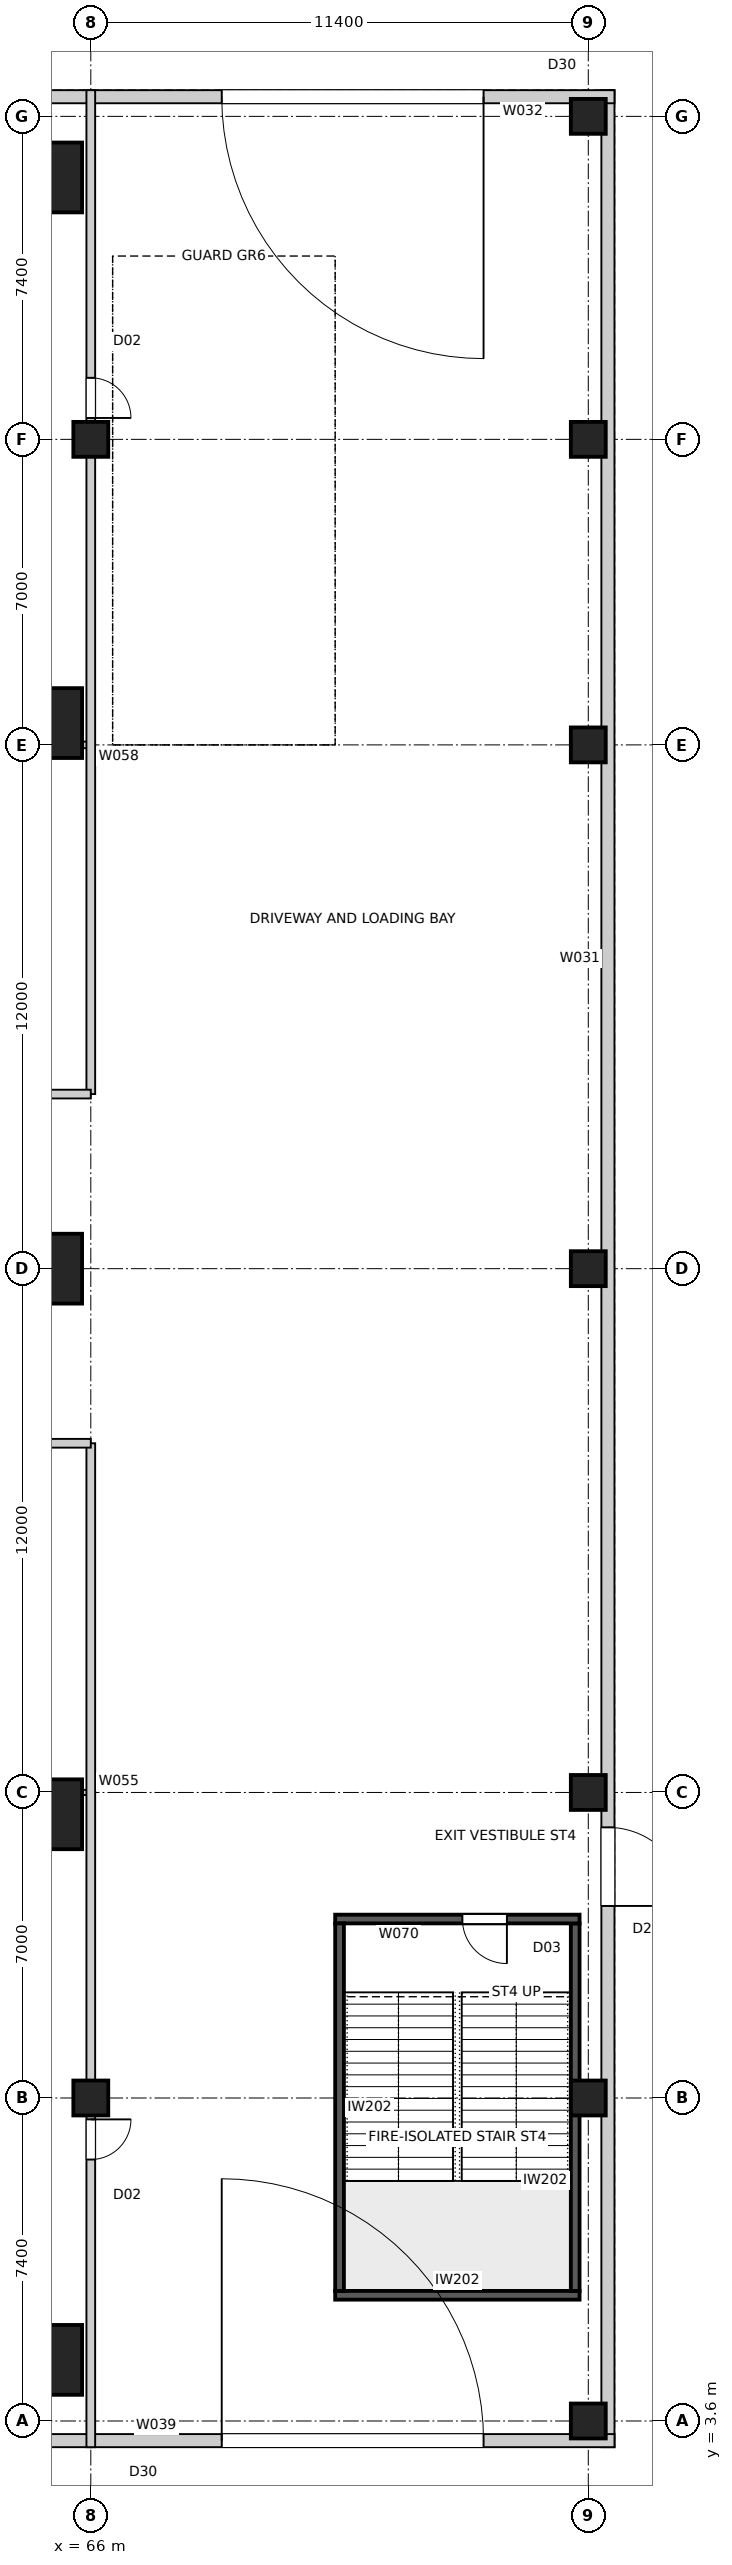
"""IFC4 building model, lengths in metres.
Left out: names, types, materials, properties, quantities, classifications, styles, units other than length and angle.
Written with IfcOpenShell. Run it as: python <this file> out.ifc"""

import sys

from ifc_helpers import new_model, si_unit, direction, frame, frame_2d, origin, origin_2d, place, context, subcontext, project, spatial, rectangle, extrude, element, fill, save


model = new_model("IFC4")
c1 = context("Model", 3, precision=1e-05, world=origin(), true_north=direction((0.0, 1.0)))
c2 = subcontext(c1, "Body", "Model", "MODEL_VIEW")
j1 = project(units=[si_unit("LENGTHUNIT", "METRE"), si_unit("PLANEANGLEUNIT", "RADIAN")], contexts=[c1])
p1 = place(None, origin())
s1 = spatial("IfcSite", under=j1, at=p1, CompositionType="ELEMENT")
p2 = place(p1, origin())
s2 = spatial("IfcBuilding", under=s1, at=p2, CompositionType="ELEMENT")
p3 = place(p2, origin())
s3 = spatial("IfcBuildingStorey", under=s2, at=p3, CompositionType="ELEMENT", Elevation=0.0)
for number, where, z_axis, x_axis in (
    (1, (65.0, 5.0, 0.0), (0.0, 0.0, 1.0), (1.0, 0.0, 0.0)),
    (2, (65.0, 17.5, 0.0), (0.0, 0.0, 1.0), (1.0, 0.0, 0.0)),
    (3, (65.0, 30.0, 0.0), (0.0, 0.0, 1.0), (1.0, 0.0, 0.0)),
    (4, (65.0, 42.5, 0.0), (0.0, 0.0, 1.0), (1.0, 0.0, 0.0)),
    (5, (65.0, 55.0, 0.0), (0.0, 0.0, 1.0), (1.0, 0.0, 0.0)),
):
    element("IfcColumn", number, at=place(p3, frame(where, z_axis=z_axis, x_axis=x_axis)), inside=s3, PredefinedType="COLUMN", context=c2, shape_type="SweptSolid", body=[
        extrude(rectangle(XDim=1.6, YDim=1.6, at=origin_2d()), origin(), (0.0, 0.0, 1.0), 6.0),
    ])
for number, where, z_axis, x_axis in (
    (6, (66.0, 11.0, 0.0), (0.0, 0.0, 1.0), (1.0, 0.0, 0.0)),
    (7, (66.0, 49.0, 0.0), (0.0, 0.0, 1.0), (1.0, 0.0, 0.0)),
    (8, (77.4, 3.6, 0.0), (0.0, 0.0, 1.0), (1.0, 0.0, 0.0)),
    (9, (77.4, 11.0, 0.0), (0.0, 0.0, 1.0), (1.0, 0.0, 0.0)),
    (10, (77.4, 18.0, 0.0), (0.0, 0.0, 1.0), (1.0, 0.0, 0.0)),
    (11, (77.4, 30.0, 0.0), (0.0, 0.0, 1.0), (1.0, 0.0, 0.0)),
    (12, (77.4, 42.0, 0.0), (0.0, 0.0, 1.0), (1.0, 0.0, 0.0)),
    (13, (77.4, 49.0, 0.0), (0.0, 0.0, 1.0), (1.0, 0.0, 0.0)),
    (14, (77.4, 56.4, 0.0), (0.0, 0.0, 1.0), (1.0, 0.0, 0.0)),
):
    element("IfcColumn", number, at=place(p3, frame(where, z_axis=z_axis, x_axis=x_axis)), inside=s3, PredefinedType="COLUMN", context=c2, shape_type="SweptSolid", body=[
        extrude(rectangle(XDim=0.8, YDim=0.8, at=origin_2d()), origin(), (0.0, 0.0, 1.0), 6.0),
    ])
p4 = place(p3, frame((40.0, 3.15, 0.0), z_axis=(0.0, 0.0, 1.0), x_axis=(1.0, 0.0, 0.0)))
e15 = element("IfcWall", 15, at=p4, inside=s3, PredefinedType="SOLIDWALL", context=c2, shape_type="SweptSolid", body=[
    extrude(rectangle(XDim=26.0, YDim=0.3, at=frame_2d((13.0, 0.0))), origin(), (0.0, 0.0, 1.0), 5.65),
])
p5 = place(p4, frame((2.8, 0.0, 0.6)))
e16 = element("IfcOpeningElement", 16, at=p5, cuts=e15, PredefinedType="OPENING", context=c2, shape_type="SweptSolid", body=[
    extrude(rectangle(XDim=2.4, YDim=3.6, at=frame_2d((1.2, 1.8))), frame((0.0, 0.16, 0.0), z_axis=(0.0, -1.0, 0.0), x_axis=(1.0, 0.0, 0.0)), (0.0, 0.0, 1.0), 0.32),
])
p6 = place(p4, frame((8.8, 0.0, 0.6)))
e17 = element("IfcOpeningElement", 17, at=p6, cuts=e15, PredefinedType="OPENING", context=c2, shape_type="SweptSolid", body=[
    extrude(rectangle(XDim=2.4, YDim=3.6, at=frame_2d((1.2, 1.8))), frame((0.0, 0.16, 0.0), z_axis=(0.0, -1.0, 0.0), x_axis=(1.0, 0.0, 0.0)), (0.0, 0.0, 1.0), 0.32),
])
p7 = place(p4, frame((15.1, 0.0, 0.0)))
e18 = element("IfcOpeningElement", 18, at=p7, cuts=e15, PredefinedType="OPENING", context=c2, shape_type="SweptSolid", body=[
    extrude(rectangle(XDim=1.8, YDim=2.7, at=frame_2d((0.9, 1.35))), frame((0.0, 0.16, 0.0), z_axis=(0.0, -1.0, 0.0), x_axis=(1.0, 0.0, 0.0)), (0.0, 0.0, 1.0), 0.32),
])
p8 = place(p4, frame((20.8, 0.0, 0.6)))
e19 = element("IfcOpeningElement", 19, at=p8, cuts=e15, PredefinedType="OPENING", context=c2, shape_type="SweptSolid", body=[
    extrude(rectangle(XDim=2.4, YDim=3.6, at=frame_2d((1.2, 1.8))), frame((0.0, 0.16, 0.0), z_axis=(0.0, -1.0, 0.0), x_axis=(1.0, 0.0, 0.0)), (0.0, 0.0, 1.0), 0.32),
])
p9 = place(p3, frame((66.0, 3.15, 0.0), z_axis=(0.0, 0.0, 1.0), x_axis=(1.0, 0.0, 0.0)))
e20 = element("IfcWall", 20, at=p9, inside=s3, PredefinedType="SOLIDWALL", context=c2, shape_type="SweptSolid", body=[
    extrude(rectangle(XDim=12.0, YDim=0.3, at=frame_2d((6.0, 0.0))), origin(), (0.0, 0.0, 1.0), 5.65),
])
p10 = place(p9, frame((3.0, 0.0, 0.0)))
e21 = element("IfcOpeningElement", 21, at=p10, cuts=e20, PredefinedType="OPENING", context=c2, shape_type="SweptSolid", body=[
    extrude(rectangle(XDim=6.0, YDim=4.5, at=frame_2d((3.0, 2.25))), frame((0.0, 0.16, 0.0), z_axis=(0.0, -1.0, 0.0), x_axis=(1.0, 0.0, 0.0)), (0.0, 0.0, 1.0), 0.32),
])
p11 = place(p3, frame((78.0, 56.85, 0.0), z_axis=(0.0, 0.0, 1.0), x_axis=(-1.0, 0.0, 0.0)))
e22 = element("IfcWall", 22, at=p11, inside=s3, PredefinedType="SOLIDWALL", context=c2, shape_type="SweptSolid", body=[
    extrude(rectangle(XDim=12.0, YDim=0.3, at=frame_2d((6.0, 0.0))), origin(), (0.0, 0.0, 1.0), 5.65),
])
p12 = place(p11, frame((3.0, 0.0, 0.0)))
e23 = element("IfcOpeningElement", 23, at=p12, cuts=e22, PredefinedType="OPENING", context=c2, shape_type="SweptSolid", body=[
    extrude(rectangle(XDim=6.0, YDim=4.5, at=frame_2d((3.0, 2.25))), frame((0.0, 0.16, 0.0), z_axis=(0.0, -1.0, 0.0), x_axis=(1.0, 0.0, 0.0)), (0.0, 0.0, 1.0), 0.32),
])
p13 = place(p3, frame((66.0, 56.85, 0.0), z_axis=(0.0, 0.0, 1.0), x_axis=(-1.0, 0.0, 0.0)))
e24 = element("IfcWall", 24, at=p13, inside=s3, PredefinedType="SOLIDWALL", context=c2, shape_type="SweptSolid", body=[
    extrude(rectangle(XDim=26.0, YDim=0.3, at=frame_2d((13.0, 0.0))), origin(), (0.0, 0.0, 1.0), 5.65),
])
p14 = place(p13, frame((2.8, 0.0, 0.6)))
e25 = element("IfcOpeningElement", 25, at=p14, cuts=e24, PredefinedType="OPENING", context=c2, shape_type="SweptSolid", body=[
    extrude(rectangle(XDim=2.4, YDim=3.6, at=frame_2d((1.2, 1.8))), frame((0.0, 0.16, 0.0), z_axis=(0.0, -1.0, 0.0), x_axis=(1.0, 0.0, 0.0)), (0.0, 0.0, 1.0), 0.32),
])
p15 = place(p13, frame((8.8, 0.0, 0.6)))
e26 = element("IfcOpeningElement", 26, at=p15, cuts=e24, PredefinedType="OPENING", context=c2, shape_type="SweptSolid", body=[
    extrude(rectangle(XDim=2.4, YDim=3.6, at=frame_2d((1.2, 1.8))), frame((0.0, 0.16, 0.0), z_axis=(0.0, -1.0, 0.0), x_axis=(1.0, 0.0, 0.0)), (0.0, 0.0, 1.0), 0.32),
])
p16 = place(p13, frame((15.1, 0.0, 0.0)))
e27 = element("IfcOpeningElement", 27, at=p16, cuts=e24, PredefinedType="OPENING", context=c2, shape_type="SweptSolid", body=[
    extrude(rectangle(XDim=1.8, YDim=2.7, at=frame_2d((0.9, 1.35))), frame((0.0, 0.16, 0.0), z_axis=(0.0, -1.0, 0.0), x_axis=(1.0, 0.0, 0.0)), (0.0, 0.0, 1.0), 0.32),
])
p17 = place(p13, frame((20.8, 0.0, 0.6)))
e28 = element("IfcOpeningElement", 28, at=p17, cuts=e24, PredefinedType="OPENING", context=c2, shape_type="SweptSolid", body=[
    extrude(rectangle(XDim=2.4, YDim=3.6, at=frame_2d((1.2, 1.8))), frame((0.0, 0.16, 0.0), z_axis=(0.0, -1.0, 0.0), x_axis=(1.0, 0.0, 0.0)), (0.0, 0.0, 1.0), 0.32),
])
p18 = place(p3, frame((77.85, 3.0, 0.0), z_axis=(0.0, 0.0, 1.0), x_axis=(0.0, 1.0, 0.0)))
e29 = element("IfcWall", 29, at=p18, inside=s3, PredefinedType="SOLIDWALL", context=c2, shape_type="SweptSolid", body=[
    extrude(rectangle(XDim=54.0, YDim=0.3, at=frame_2d((27.0, 0.0))), origin(), (0.0, 0.0, 1.0), 5.65),
])
p19 = place(p18, frame((12.4, 0.0, 0.0)))
e30 = element("IfcOpeningElement", 30, at=p19, cuts=e29, PredefinedType="OPENING", context=c2, shape_type="SweptSolid", body=[
    extrude(rectangle(XDim=1.8, YDim=2.7, at=frame_2d((0.9, 1.35))), frame((0.0, 0.16, 0.0), z_axis=(0.0, -1.0, 0.0), x_axis=(1.0, 0.0, 0.0)), (0.0, 0.0, 1.0), 0.32),
])
p20 = place(p3, frame((71.6, 6.48, 0.0), z_axis=(0.0, 0.0, 1.0), x_axis=(1.0, 0.0, 0.0)))
e31 = element("IfcWall", 31, at=p20, inside=s3, PredefinedType="SOLIDWALL", context=c2, shape_type="SweptSolid", body=[
    extrude(rectangle(XDim=5.6, YDim=0.2, at=frame_2d((2.8, 0.0))), origin(), (0.0, 0.0, 1.0), 5.65),
])
p21 = place(p3, frame((77.1, 6.58, 0.0), z_axis=(0.0, 0.0, 1.0), x_axis=(0.0, 1.0, 0.0)))
e32 = element("IfcWall", 32, at=p21, inside=s3, PredefinedType="SOLIDWALL", context=c2, shape_type="SweptSolid", body=[
    extrude(rectangle(XDim=8.42, YDim=0.2, at=frame_2d((4.21, 0.0))), origin(), (0.0, 0.0, 1.0), 5.65),
])
p22 = place(p3, frame((77.2, 15.1, 0.0), z_axis=(0.0, 0.0, 1.0), x_axis=(-1.0, 0.0, 0.0)))
e33 = element("IfcWall", 33, at=p22, inside=s3, PredefinedType="SOLIDWALL", context=c2, shape_type="SweptSolid", body=[
    extrude(rectangle(XDim=5.6, YDim=0.2, at=frame_2d((2.8, 0.0))), origin(), (0.0, 0.0, 1.0), 5.65),
])
p23 = place(p22, frame((1.665, 0.0, 0.0)))
e34 = element("IfcOpeningElement", 34, at=p23, cuts=e33, PredefinedType="OPENING", context=c2, shape_type="SweptSolid", body=[
    extrude(rectangle(XDim=1.02, YDim=2.1, at=frame_2d((0.51, 1.05))), frame((0.0, 0.11, 0.0), z_axis=(0.0, -1.0, 0.0), x_axis=(1.0, 0.0, 0.0)), (0.0, 0.0, 1.0), 0.22),
])
p24 = place(p3, frame((71.7, 15.0, 0.0), z_axis=(0.0, 0.0, 1.0), x_axis=(0.0, -1.0, 0.0)))
e35 = element("IfcWall", 35, at=p24, inside=s3, PredefinedType="SOLIDWALL", context=c2, shape_type="SweptSolid", body=[
    extrude(rectangle(XDim=8.42, YDim=0.2, at=frame_2d((4.21, 0.0))), origin(), (0.0, 0.0, 1.0), 5.65),
])
p25 = place(p3, frame((52.1, 18.0, 0.0), z_axis=(0.0, 0.0, 1.0), x_axis=(1.0, 0.0, 0.0)))
e36 = element("IfcWall", 36, at=p25, inside=s3, PredefinedType="PARTITIONING", context=c2, shape_type="SweptSolid", body=[
    extrude(rectangle(XDim=13.9, YDim=0.12, at=frame_2d((6.95, 0.0))), origin(), (0.0, 0.0, 1.0), 5.65),
])
p26 = place(p3, frame((66.0, 26.0, 0.0), z_axis=(0.0, 0.0, 1.0), x_axis=(0.0, -1.0, 0.0)))
e37 = element("IfcWall", 37, at=p26, inside=s3, PredefinedType="PARTITIONING", context=c2, shape_type="SweptSolid", body=[
    extrude(rectangle(XDim=23.0, YDim=0.2, at=frame_2d((11.5, 0.0))), origin(), (0.0, 0.0, 1.0), 5.65),
])
p27 = place(p26, frame((15.49, 0.0, 0.0)))
e38 = element("IfcOpeningElement", 38, at=p27, cuts=e37, PredefinedType="OPENING", context=c2, shape_type="SweptSolid", body=[
    extrude(rectangle(XDim=0.92, YDim=2.34, at=frame_2d((0.46, 1.17))), frame((0.0, 0.11, 0.0), z_axis=(0.0, -1.0, 0.0), x_axis=(1.0, 0.0, 0.0)), (0.0, 0.0, 1.0), 0.22),
])
p28 = place(p3, frame((66.0, 42.0, 0.0), z_axis=(0.0, 0.0, 1.0), x_axis=(-1.0, 0.0, 0.0)))
e39 = element("IfcWall", 39, at=p28, inside=s3, PredefinedType="SOLIDWALL", context=c2, shape_type="SweptSolid", body=[
    extrude(rectangle(XDim=13.9, YDim=0.15, at=frame_2d((6.95, 0.0))), origin(), (0.0, 0.0, 1.0), 5.65),
])
p29 = place(p3, frame((66.0, 57.0, 0.0), z_axis=(0.0, 0.0, 1.0), x_axis=(0.0, -1.0, 0.0)))
e40 = element("IfcWall", 40, at=p29, inside=s3, PredefinedType="PARTITIONING", context=c2, shape_type="SweptSolid", body=[
    extrude(rectangle(XDim=23.0, YDim=0.2, at=frame_2d((11.5, 0.0))), origin(), (0.0, 0.0, 1.0), 5.65),
])
p30 = place(p29, frame((6.59, 0.0, 0.0)))
e41 = element("IfcOpeningElement", 41, at=p30, cuts=e40, PredefinedType="OPENING", context=c2, shape_type="SweptSolid", body=[
    extrude(rectangle(XDim=0.92, YDim=2.34, at=frame_2d((0.46, 1.17))), frame((0.0, 0.11, 0.0), z_axis=(0.0, -1.0, 0.0), x_axis=(1.0, 0.0, 0.0)), (0.0, 0.0, 1.0), 0.22),
])
p31 = place(p3, frame((66.0, 26.0, 0.0), z_axis=(0.0, 0.0, 1.0), x_axis=(-1.0, 0.0, 0.0)))
e42 = element("IfcWall", 42, at=p31, inside=s3, PredefinedType="PARTITIONING", context=c2, shape_type="SweptSolid", body=[
    extrude(rectangle(XDim=13.9, YDim=0.2, at=frame_2d((6.95, 0.0))), origin(), (0.0, 0.0, 1.0), 5.65),
])
p32 = place(p31, frame((6.59, 0.0, 0.0)))
e43 = element("IfcOpeningElement", 43, at=p32, cuts=e42, PredefinedType="OPENING", context=c2, shape_type="SweptSolid", body=[
    extrude(rectangle(XDim=0.92, YDim=2.34, at=frame_2d((0.46, 1.17))), frame((0.0, 0.11, 0.0), z_axis=(0.0, -1.0, 0.0), x_axis=(1.0, 0.0, 0.0)), (0.0, 0.0, 1.0), 0.22),
])
p33 = place(p31, frame((2.065, 0.0, 0.0)))
e44 = element("IfcOpeningElement", 44, at=p33, cuts=e42, PredefinedType="OPENING", context=c2, shape_type="SweptSolid", body=[
    extrude(rectangle(XDim=0.92, YDim=2.34, at=frame_2d((0.46, 1.17))), frame((0.0, 0.11, 0.0), z_axis=(0.0, -1.0, 0.0), x_axis=(1.0, 0.0, 0.0)), (0.0, 0.0, 1.0), 0.22),
])
p34 = place(p31, frame((11.465, 0.0, 0.0)))
e45 = element("IfcOpeningElement", 45, at=p34, cuts=e42, PredefinedType="OPENING", context=c2, shape_type="SweptSolid", body=[
    extrude(rectangle(XDim=0.92, YDim=2.34, at=frame_2d((0.46, 1.17))), frame((0.0, 0.11, 0.0), z_axis=(0.0, -1.0, 0.0), x_axis=(1.0, 0.0, 0.0)), (0.0, 0.0, 1.0), 0.22),
])
p35 = place(p3, frame((52.1, 34.0, 0.0), z_axis=(0.0, 0.0, 1.0), x_axis=(1.0, 0.0, 0.0)))
e46 = element("IfcWall", 46, at=p35, inside=s3, PredefinedType="PARTITIONING", context=c2, shape_type="SweptSolid", body=[
    extrude(rectangle(XDim=13.9, YDim=0.2, at=frame_2d((6.95, 0.0))), origin(), (0.0, 0.0, 1.0), 5.65),
])
p36 = place(p35, frame((9.865, 0.0, 0.0)))
e47 = element("IfcOpeningElement", 47, at=p36, cuts=e46, PredefinedType="OPENING", context=c2, shape_type="SweptSolid", body=[
    extrude(rectangle(XDim=1.02, YDim=2.1, at=frame_2d((0.51, 1.05))), frame((0.0, 0.11, 0.0), z_axis=(0.0, -1.0, 0.0), x_axis=(1.0, 0.0, 0.0)), (0.0, 0.0, 1.0), 0.22),
])
p37 = place(p35, frame((2.965, 0.0, 0.0)))
e48 = element("IfcOpeningElement", 48, at=p37, cuts=e46, PredefinedType="OPENING", context=c2, shape_type="SweptSolid", body=[
    extrude(rectangle(XDim=1.02, YDim=2.1, at=frame_2d((0.51, 1.05))), frame((0.0, 0.11, 0.0), z_axis=(0.0, -1.0, 0.0), x_axis=(1.0, 0.0, 0.0)), (0.0, 0.0, 1.0), 0.22),
])
p38 = place(p10, origin())
e49 = element("IfcDoor", 49, at=p38, inside=s3, OperationType="ROLLINGUP", PredefinedType="DOOR", context=c2, shape_type="SweptSolid", body=[
    extrude(rectangle(XDim=6.0, YDim=4.5, at=frame_2d((3.0, 2.25))), frame((0.0, 0.025, 0.0), z_axis=(0.0, -1.0, 0.0), x_axis=(1.0, 0.0, 0.0)), (0.0, 0.0, 1.0), 0.05),
])
fill(e21, e49)
p39 = place(p12, origin())
e50 = element("IfcDoor", 50, at=p39, inside=s3, OperationType="ROLLINGUP", PredefinedType="DOOR", context=c2, shape_type="SweptSolid", body=[
    extrude(rectangle(XDim=6.0, YDim=4.5, at=frame_2d((3.0, 2.25))), frame((0.0, 0.025, 0.0), z_axis=(0.0, -1.0, 0.0), x_axis=(1.0, 0.0, 0.0)), (0.0, 0.0, 1.0), 0.05),
])
fill(e23, e50)
p40 = place(p19, frame((1.8, 0.0, 0.0), z_axis=(0.0, 0.0, 1.0), x_axis=(-1.0, 0.0, 0.0)))
e51 = element("IfcDoor", 51, at=p40, inside=s3, OperationType="DOUBLE_DOOR_DOUBLE_SWING", PredefinedType="DOOR", context=c2, shape_type="SweptSolid", body=[
    extrude(rectangle(XDim=1.8, YDim=2.7, at=frame_2d((0.9, 1.35))), frame((0.0, 0.025, 0.0), z_axis=(0.0, -1.0, 0.0), x_axis=(1.0, 0.0, 0.0)), (0.0, 0.0, 1.0), 0.05),
])
fill(e30, e51)
p41 = place(p27, origin())
e52 = element("IfcDoor", 52, at=p41, inside=s3, OperationType="SINGLE_SWING_LEFT", PredefinedType="DOOR", context=c2, shape_type="SweptSolid", body=[
    extrude(rectangle(XDim=0.92, YDim=2.34, at=frame_2d((0.46, 1.17))), frame((0.0, 0.025, 0.0), z_axis=(0.0, -1.0, 0.0), x_axis=(1.0, 0.0, 0.0)), (0.0, 0.0, 1.0), 0.05),
])
fill(e38, e52)
p42 = place(p30, origin())
e53 = element("IfcDoor", 53, at=p42, inside=s3, OperationType="SINGLE_SWING_RIGHT", PredefinedType="DOOR", context=c2, shape_type="SweptSolid", body=[
    extrude(rectangle(XDim=0.92, YDim=2.34, at=frame_2d((0.46, 1.17))), frame((0.0, 0.025, 0.0), z_axis=(0.0, -1.0, 0.0), x_axis=(1.0, 0.0, 0.0)), (0.0, 0.0, 1.0), 0.05),
])
fill(e41, e53)
p43 = place(p23, origin())
e54 = element("IfcDoor", 54, at=p43, inside=s3, OperationType="SINGLE_SWING_LEFT", PredefinedType="DOOR", context=c2, shape_type="SweptSolid", body=[
    extrude(rectangle(XDim=1.02, YDim=2.1, at=frame_2d((0.51, 1.05))), frame((0.0, 0.025, 0.0), z_axis=(0.0, -1.0, 0.0), x_axis=(1.0, 0.0, 0.0)), (0.0, 0.0, 1.0), 0.05),
])
fill(e34, e54)
save(model, sys.argv[1])
